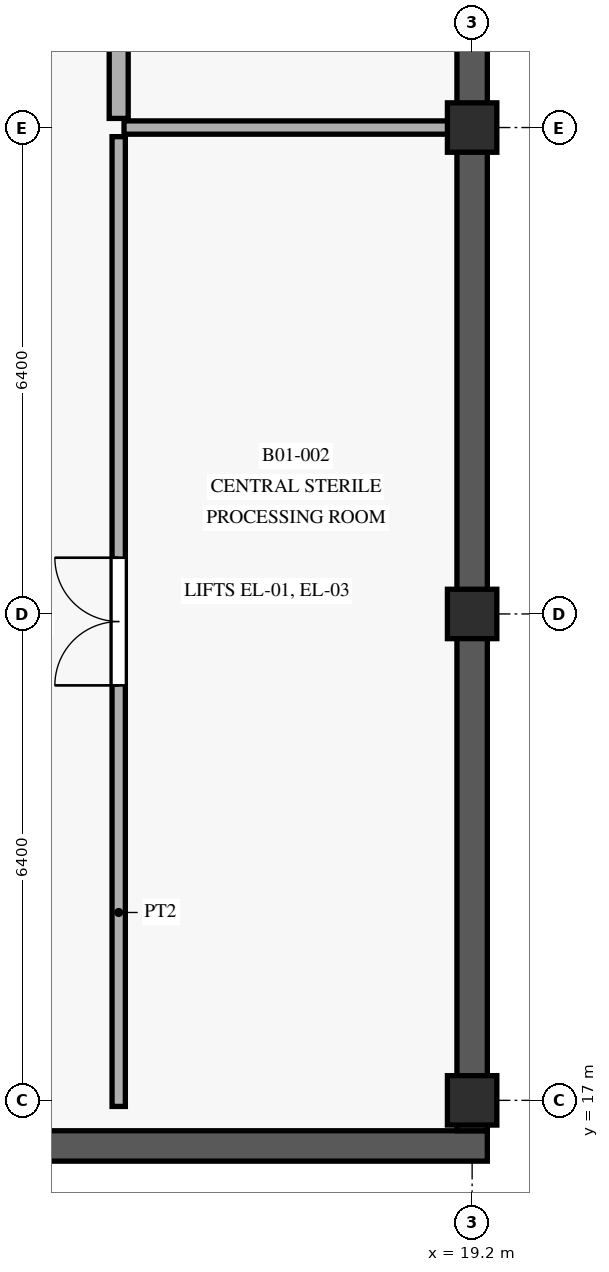
"""IFC4 building model, lengths in metres.
Left out: names, types, materials, properties, quantities, classifications, styles, units other than length and angle.
Written with IfcOpenShell. Run it as: python <this file> out.ifc"""

import sys

from ifc_helpers import new_model, si_unit, direction, frame, frame_2d, origin, origin_with_axes, origin_2d, place, context, subcontext, project, spatial, rectangle, extrude, element, fill, save


model = new_model("IFC4")
c1 = context("Model", 3, precision=1e-05, world=origin(), true_north=direction((0.0, 1.0)))
c2 = subcontext(c1, "Body", "Model", "MODEL_VIEW")
j1 = project(units=[si_unit("LENGTHUNIT", "METRE"), si_unit("PLANEANGLEUNIT", "RADIAN")], contexts=[c1])
p1 = place(None, origin())
s1 = spatial("IfcSite", under=j1, at=p1, CompositionType="ELEMENT")
p2 = place(p1, origin())
s2 = spatial("IfcBuilding", under=s1, at=p2, CompositionType="ELEMENT")
p3 = place(p2, frame((0.0, 0.0, -4.5)))
s3 = spatial("IfcBuildingStorey", under=s2, at=p3, CompositionType="ELEMENT", Elevation=-4.5)
for number, where, z_axis, x_axis in (
    (1, (19.2, 17.0, 0.0), (0.0, 0.0, 1.0), (1.0, 0.0, 0.0)),
    (2, (19.2, 23.4, 0.0), (0.0, 0.0, 1.0), (1.0, 0.0, 0.0)),
    (3, (19.2, 29.8, 0.0), (0.0, 0.0, 1.0), (1.0, 0.0, 0.0)),
):
    element("IfcColumn", number, at=place(p3, frame(where, z_axis=z_axis, x_axis=x_axis)), inside=s3, PredefinedType="COLUMN", context=c2, shape_type="SweptSolid", body=[
        extrude(rectangle(XDim=0.65, YDim=0.65, at=origin_2d()), origin(), (0.0, 0.0, 1.0), 4.5),
    ])
p4 = place(p3, frame((4.4, 16.4, 0.0), z_axis=(0.0, 0.0, 1.0), x_axis=(1.0, 0.0, 0.0)))
e4 = element("IfcWall", 4, at=p4, inside=s3, PredefinedType="SHEAR", context=c2, shape_type="SweptSolid", body=[
    extrude(rectangle(XDim=15.0, YDim=0.4, at=frame_2d((7.5, 0.0))), origin(), (0.0, 0.0, 1.0), 4.15),
])
p5 = place(p3, frame((19.2, 16.6, 0.0), z_axis=(0.0, 0.0, 1.0), x_axis=(0.0, 1.0, 0.0)))
e5 = element("IfcWall", 5, at=p5, inside=s3, PredefinedType="SHEAR", context=c2, shape_type="SweptSolid", body=[
    extrude(rectangle(XDim=43.6, YDim=0.4, at=frame_2d((21.8, 0.0))), origin(), (0.0, 0.0, 1.0), 4.15),
])
p6 = place(p3, frame((14.55, 16.92, 0.0), z_axis=(0.0, 0.0, 1.0), x_axis=(0.0, 1.0, 0.0)))
e6 = element("IfcWall", 6, at=p6, inside=s3, PredefinedType="PARTITIONING", context=c2, shape_type="SweptSolid", body=[
    extrude(rectangle(XDim=12.76, YDim=0.175, at=frame_2d((6.38, 0.0))), origin(), (0.0, 0.0, 1.0), 3.595),
])
p7 = place(p6, frame((5.54, 0.0, 0.0)))
e7 = element("IfcOpeningElement", 7, at=p7, cuts=e6, PredefinedType="OPENING", context=c2, shape_type="SweptSolid", body=[
    extrude(rectangle(XDim=1.68, YDim=2.25, at=frame_2d((0.84, 1.125))), frame((0.0, 0.098, 0.0), z_axis=(0.0, -1.0, 0.0), x_axis=(1.0, 0.0, 0.0)), (0.0, 0.0, 1.0), 0.195),
])
p8 = place(p3, frame((14.62, 29.8, 0.0), z_axis=(0.0, 0.0, 1.0), x_axis=(1.0, 0.0, 0.0)))
e8 = element("IfcWall", 8, at=p8, inside=s3, PredefinedType="PARTITIONING", context=c2, shape_type="SweptSolid", body=[
    extrude(rectangle(XDim=4.38, YDim=0.175, at=frame_2d((2.19, 0.0))), origin(), (0.0, 0.0, 1.0), 3.595),
])
p9 = place(p3, frame((14.55, 29.92, 0.0), z_axis=(0.0, 0.0, 1.0), x_axis=(0.0, 1.0, 0.0)))
e9 = element("IfcWall", 9, at=p9, inside=s3, PredefinedType="SOLIDWALL", context=c2, shape_type="SweptSolid", body=[
    extrude(rectangle(XDim=9.16, YDim=0.25, at=frame_2d((4.58, 0.0))), origin(), (0.0, 0.0, 1.0), 3.595),
])
p10 = place(p9, frame((4.04, 0.0, 0.0)))
e10 = element("IfcOpeningElement", 10, at=p10, cuts=e9, PredefinedType="OPENING", context=c2, shape_type="SweptSolid", body=[
    extrude(rectangle(XDim=1.08, YDim=2.2, at=frame_2d((0.54, 1.1))), frame((0.0, 0.135, 0.0), z_axis=(0.0, -1.0, 0.0), x_axis=(1.0, 0.0, 0.0)), (0.0, 0.0, 1.0), 0.27),
])
p11 = place(p7, origin_with_axes())
e11 = element("IfcDoor", 11, at=p11, inside=s3, OperationType="DOUBLE_DOOR_SINGLE_SWING", PredefinedType="DOOR", context=c2, shape_type="SweptSolid", body=[
    extrude(rectangle(XDim=1.68, YDim=2.25, at=frame_2d((0.84, 1.125))), frame((0.0, 0.025, 0.0), z_axis=(0.0, -1.0, 0.0), x_axis=(1.0, 0.0, 0.0)), (0.0, 0.0, 1.0), 0.05),
])
fill(e7, e11)
save(model, sys.argv[1])
